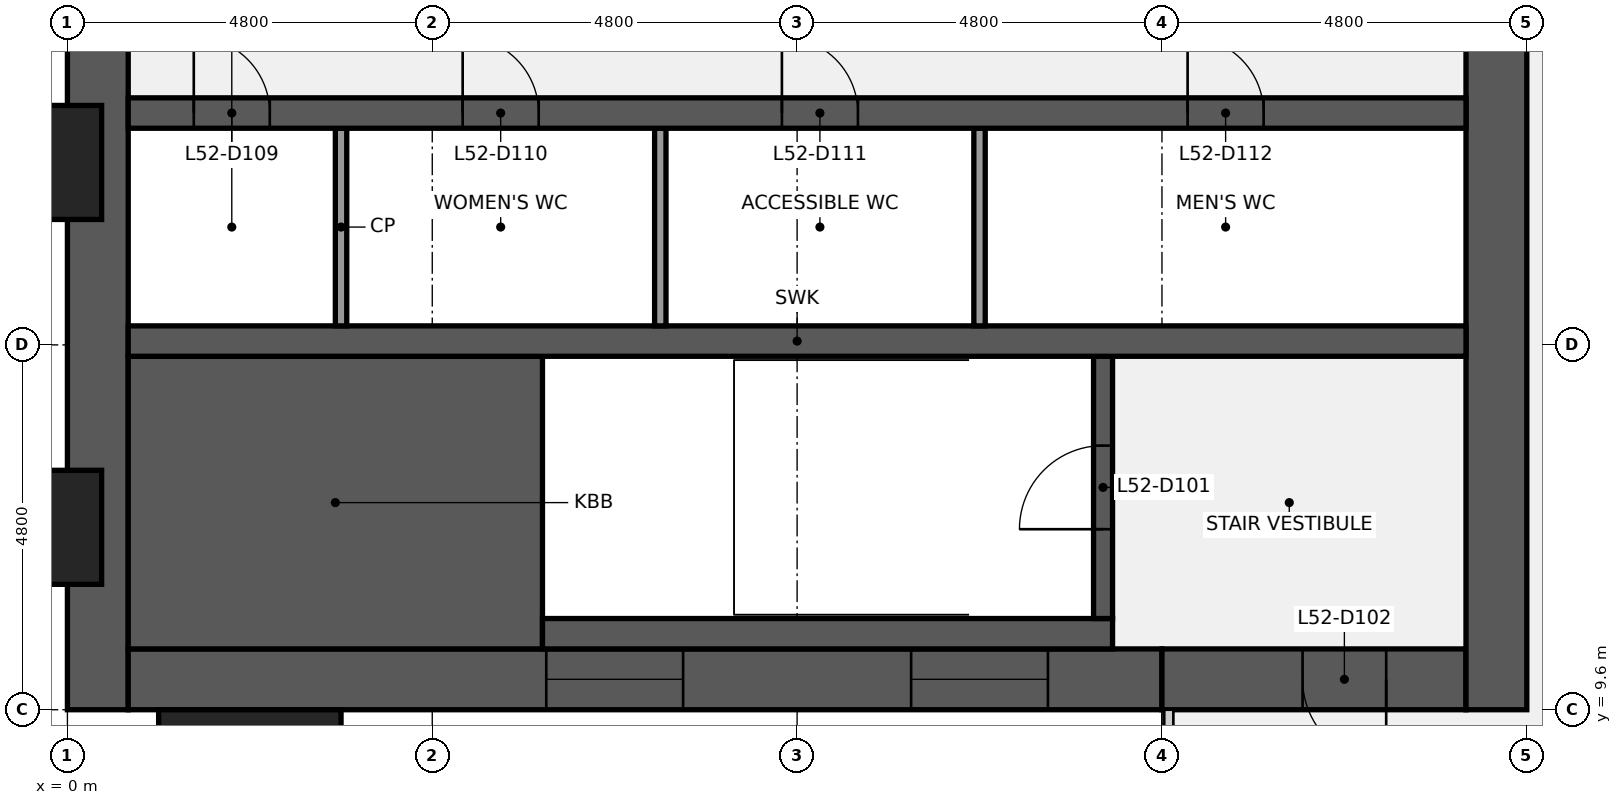
"""IFC4 building model, lengths in metres.
Left out: names, types, materials, properties, quantities, classifications, styles, units other than length and angle.
Written with IfcOpenShell. Run it as: python <this file> out.ifc"""

import sys

from ifc_helpers import new_model, si_unit, direction, frame, frame_2d, origin, origin_2d, place, context, subcontext, project, spatial, rectangle, extrude, element, fill, save


model = new_model("IFC4")
c1 = context("Model", 3, precision=1e-05, world=origin(), true_north=direction((0.0, 1.0)))
c2 = subcontext(c1, "Body", "Model", "MODEL_VIEW")
j1 = project(units=[si_unit("LENGTHUNIT", "METRE"), si_unit("PLANEANGLEUNIT", "RADIAN")], contexts=[c1])
p1 = place(None, origin())
s1 = spatial("IfcSite", under=j1, at=p1, CompositionType="ELEMENT")
p2 = place(p1, origin())
s2 = spatial("IfcBuilding", under=s1, at=p2, CompositionType="ELEMENT")
p3 = place(p2, frame((0.0, 0.0, 237.2)))
s3 = spatial("IfcBuildingStorey", under=s2, at=p3, CompositionType="ELEMENT", Elevation=237.2)
p4 = place(p3, frame((0.4, 9.6, 0.0), z_axis=(0.0, 0.0, 1.0), x_axis=(0.0, 1.0, 0.0)))
e1 = element("IfcWall", 1, at=p4, inside=s3, PredefinedType="SHEAR", context=c2, shape_type="SweptSolid", body=[
    extrude(rectangle(XDim=28.8, YDim=0.8, at=frame_2d((14.4, 0.0))), origin(), (0.0, 0.0, 1.0), 3.84),
])
p5 = place(p4, frame((8.85, 0.0, 0.9)))
e2 = element("IfcOpeningElement", 2, at=p5, cuts=e1, PredefinedType="OPENING", context=c2, shape_type="SweptSolid", body=[
    extrude(rectangle(XDim=1.5, YDim=1.5, at=frame_2d((0.75, 0.75))), frame((0.0, 0.41, 0.0), z_axis=(0.0, -1.0, 0.0), x_axis=(1.0, 0.0, 0.0)), (0.0, 0.0, 1.0), 0.82),
])
p6 = place(p4, frame((18.45, 0.0, 0.9)))
e3 = element("IfcOpeningElement", 3, at=p6, cuts=e1, PredefinedType="OPENING", context=c2, shape_type="SweptSolid", body=[
    extrude(rectangle(XDim=1.5, YDim=1.5, at=frame_2d((0.75, 0.75))), frame((0.0, 0.41, 0.0), z_axis=(0.0, -1.0, 0.0), x_axis=(1.0, 0.0, 0.0)), (0.0, 0.0, 1.0), 0.82),
])
p7 = place(p3, frame((14.4, 10.0, 0.0), z_axis=(0.0, 0.0, 1.0), x_axis=(-1.0, 0.0, 0.0)))
e4 = element("IfcWall", 4, at=p7, inside=s3, PredefinedType="SHEAR", context=c2, shape_type="SweptSolid", body=[
    extrude(rectangle(XDim=13.6, YDim=0.8, at=frame_2d((6.8, 0.0))), origin(), (0.0, 0.0, 1.0), 3.84),
])
p8 = place(p7, frame((6.3, 0.0, 0.9)))
e5 = element("IfcOpeningElement", 5, at=p8, cuts=e4, PredefinedType="OPENING", context=c2, shape_type="SweptSolid", body=[
    extrude(rectangle(XDim=1.8, YDim=1.5, at=frame_2d((0.9, 0.75))), frame((0.0, 0.41, 0.0), z_axis=(0.0, -1.0, 0.0), x_axis=(1.0, 0.0, 0.0)), (0.0, 0.0, 1.0), 0.82),
])
p9 = place(p7, frame((1.5, 0.0, 0.9)))
e6 = element("IfcOpeningElement", 6, at=p9, cuts=e4, PredefinedType="OPENING", context=c2, shape_type="SweptSolid", body=[
    extrude(rectangle(XDim=1.8, YDim=1.5, at=frame_2d((0.9, 0.75))), frame((0.0, 0.41, 0.0), z_axis=(0.0, -1.0, 0.0), x_axis=(1.0, 0.0, 0.0)), (0.0, 0.0, 1.0), 0.82),
])
p10 = place(p3, frame((18.4, 10.0, 0.0), z_axis=(0.0, 0.0, 1.0), x_axis=(-1.0, 0.0, 0.0)))
e7 = element("IfcWall", 7, at=p10, inside=s3, PredefinedType="SHEAR", context=c2, shape_type="SweptSolid", body=[
    extrude(rectangle(XDim=4.0, YDim=0.8, at=frame_2d((2.0, 0.0))), origin(), (0.0, 0.0, 1.0), 3.84),
])
p11 = place(p10, frame((1.05, 0.0, 0.0)))
e8 = element("IfcOpeningElement", 8, at=p11, cuts=e7, PredefinedType="OPENING", context=c2, shape_type="SweptSolid", body=[
    extrude(rectangle(XDim=1.1, YDim=2.1, at=frame_2d((0.55, 1.05))), frame((0.0, 0.41, 0.0), z_axis=(0.0, -1.0, 0.0), x_axis=(1.0, 0.0, 0.0)), (0.0, 0.0, 1.0), 0.82),
])
p12 = place(p3, frame((18.8, 38.4, 0.0), z_axis=(0.0, 0.0, 1.0), x_axis=(0.0, -1.0, 0.0)))
e9 = element("IfcWall", 9, at=p12, inside=s3, PredefinedType="SHEAR", context=c2, shape_type="SweptSolid", body=[
    extrude(rectangle(XDim=28.8, YDim=0.8, at=frame_2d((14.4, 0.0))), origin(), (0.0, 0.0, 1.0), 3.84),
])
p13 = place(p12, frame((18.3, 0.0, 0.0)))
e10 = element("IfcOpeningElement", 10, at=p13, cuts=e9, PredefinedType="OPENING", context=c2, shape_type="SweptSolid", body=[
    extrude(rectangle(XDim=1.8, YDim=2.1, at=frame_2d((0.9, 1.05))), frame((0.0, 0.41, 0.0), z_axis=(0.0, -1.0, 0.0), x_axis=(1.0, 0.0, 0.0)), (0.0, 0.0, 1.0), 0.82),
])
p14 = place(p12, frame((8.7, 0.0, 0.0)))
e11 = element("IfcOpeningElement", 11, at=p14, cuts=e9, PredefinedType="OPENING", context=c2, shape_type="SweptSolid", body=[
    extrude(rectangle(XDim=1.8, YDim=2.1, at=frame_2d((0.9, 1.05))), frame((0.0, 0.41, 0.0), z_axis=(0.0, -1.0, 0.0), x_axis=(1.0, 0.0, 0.0)), (0.0, 0.0, 1.0), 0.82),
])
p15 = place(p3, frame((0.8, 12.325, 0.0), z_axis=(0.0, 0.0, 1.0), x_axis=(1.0, 0.0, 0.0)))
e12 = element("IfcWall", 12, at=p15, inside=s3, PredefinedType="SHEAR", context=c2, shape_type="SweptSolid", body=[
    extrude(rectangle(XDim=5.45, YDim=3.85, at=frame_2d((2.725, 0.0))), origin(), (0.0, 0.0, 1.0), 3.84),
])
p16 = place(p3, frame((6.25, 10.6, 0.0), z_axis=(0.0, 0.0, 1.0), x_axis=(1.0, 0.0, 0.0)))
e13 = element("IfcWall", 13, at=p16, inside=s3, PredefinedType="SHEAR", context=c2, shape_type="SweptSolid", body=[
    extrude(rectangle(XDim=7.5, YDim=0.4, at=frame_2d((3.75, 0.0))), origin(), (0.0, 0.0, 1.0), 3.84),
])
p17 = place(p3, frame((13.625, 10.8, 0.0), z_axis=(0.0, 0.0, 1.0), x_axis=(0.0, 1.0, 0.0)))
e14 = element("IfcWall", 14, at=p17, inside=s3, PredefinedType="SHEAR", context=c2, shape_type="SweptSolid", body=[
    extrude(rectangle(XDim=3.45, YDim=0.25, at=frame_2d((1.725, 0.0))), origin(), (0.0, 0.0, 1.0), 3.84),
])
p18 = place(p17, frame((1.175, 0.0, 0.0)))
e15 = element("IfcOpeningElement", 15, at=p18, cuts=e14, PredefinedType="OPENING", context=c2, shape_type="SweptSolid", body=[
    extrude(rectangle(XDim=1.1, YDim=2.1, at=frame_2d((0.55, 1.05))), frame((0.0, 0.135, 0.0), z_axis=(0.0, -1.0, 0.0), x_axis=(1.0, 0.0, 0.0)), (0.0, 0.0, 1.0), 0.27),
])
p19 = place(p3, frame((0.8, 14.45, 0.0), z_axis=(0.0, 0.0, 1.0), x_axis=(1.0, 0.0, 0.0)))
e16 = element("IfcWall", 16, at=p19, inside=s3, PredefinedType="SHEAR", context=c2, shape_type="SweptSolid", body=[
    extrude(rectangle(XDim=17.6, YDim=0.4, at=frame_2d((8.8, 0.0))), origin(), (0.0, 0.0, 1.0), 3.84),
])
for number, where, z_axis, x_axis in (
    (17, (3.6, 14.65, 0.0), (0.0, 0.0, 1.0), (0.0, 1.0, 0.0)),
    (18, (7.8, 14.65, 0.0), (0.0, 0.0, 1.0), (0.0, 1.0, 0.0)),
    (19, (12.0, 14.65, 0.0), (0.0, 0.0, 1.0), (0.0, 1.0, 0.0)),
):
    element("IfcWall", number, at=place(p3, frame(where, z_axis=z_axis, x_axis=x_axis)), inside=s3, PredefinedType="PARTITIONING", context=c2, shape_type="SweptSolid", body=[
        extrude(rectangle(XDim=2.6, YDim=0.15, at=frame_2d((1.3, 0.0))), origin(), (0.0, 0.0, 1.0), 3.84),
    ])
p20 = place(p3, frame((0.8, 17.45, 0.0), z_axis=(0.0, 0.0, 1.0), x_axis=(1.0, 0.0, 0.0)))
e20 = element("IfcWall", 20, at=p20, inside=s3, PredefinedType="SHEAR", context=c2, shape_type="SweptSolid", body=[
    extrude(rectangle(XDim=17.6, YDim=0.4, at=frame_2d((8.8, 0.0))), origin(), (0.0, 0.0, 1.0), 3.84),
])
p21 = place(p20, frame((0.863, 0.0, 0.0)))
e21 = element("IfcOpeningElement", 21, at=p21, cuts=e20, PredefinedType="OPENING", context=c2, shape_type="SweptSolid", body=[
    extrude(rectangle(XDim=1.0, YDim=2.1, at=frame_2d((0.5, 1.05))), frame((0.0, 0.21, 0.0), z_axis=(0.0, -1.0, 0.0), x_axis=(1.0, 0.0, 0.0)), (0.0, 0.0, 1.0), 0.42),
])
p22 = place(p20, frame((4.4, 0.0, 0.0)))
e22 = element("IfcOpeningElement", 22, at=p22, cuts=e20, PredefinedType="OPENING", context=c2, shape_type="SweptSolid", body=[
    extrude(rectangle(XDim=1.0, YDim=2.1, at=frame_2d((0.5, 1.05))), frame((0.0, 0.21, 0.0), z_axis=(0.0, -1.0, 0.0), x_axis=(1.0, 0.0, 0.0)), (0.0, 0.0, 1.0), 0.42),
])
p23 = place(p20, frame((8.6, 0.0, 0.0)))
e23 = element("IfcOpeningElement", 23, at=p23, cuts=e20, PredefinedType="OPENING", context=c2, shape_type="SweptSolid", body=[
    extrude(rectangle(XDim=1.0, YDim=2.1, at=frame_2d((0.5, 1.05))), frame((0.0, 0.21, 0.0), z_axis=(0.0, -1.0, 0.0), x_axis=(1.0, 0.0, 0.0)), (0.0, 0.0, 1.0), 0.42),
])
p24 = place(p20, frame((13.938, 0.0, 0.0)))
e24 = element("IfcOpeningElement", 24, at=p24, cuts=e20, PredefinedType="OPENING", context=c2, shape_type="SweptSolid", body=[
    extrude(rectangle(XDim=1.0, YDim=2.1, at=frame_2d((0.5, 1.05))), frame((0.0, 0.21, 0.0), z_axis=(0.0, -1.0, 0.0), x_axis=(1.0, 0.0, 0.0)), (0.0, 0.0, 1.0), 0.42),
])
for number, where, z_axis, x_axis in (
    (25, (-0.75, 12.0, 0.0), (0.0, 0.0, 1.0), (0.0, 1.0, 0.0)),
    (26, (-0.75, 16.8, 0.0), (0.0, 0.0, 1.0), (0.0, 1.0, 0.0)),
    (27, (2.4, 8.85, 0.0), (0.0, 0.0, 1.0), (1.0, 0.0, 0.0)),
):
    element("IfcColumn", number, at=place(p3, frame(where, z_axis=z_axis, x_axis=x_axis)), inside=s3, PredefinedType="PILASTER", context=c2, shape_type="SweptSolid", body=[
        extrude(rectangle(XDim=2.4, YDim=1.5, at=origin_2d()), origin(), (0.0, 0.0, 1.0), 4.0),
    ])
p25 = place(p18, origin())
e28 = element("IfcDoor", 28, at=p25, inside=s3, OperationType="SINGLE_SWING_LEFT", PredefinedType="DOOR", context=c2, shape_type="SweptSolid", body=[
    extrude(rectangle(XDim=1.1, YDim=2.1, at=frame_2d((0.55, 1.05))), frame((0.0, 0.025, 0.0), z_axis=(0.0, -1.0, 0.0), x_axis=(1.0, 0.0, 0.0)), (0.0, 0.0, 1.0), 0.05),
])
fill(e15, e28)
p26 = place(p11, origin())
e29 = element("IfcDoor", 29, at=p26, inside=s3, OperationType="SINGLE_SWING_LEFT", PredefinedType="DOOR", context=c2, shape_type="SweptSolid", body=[
    extrude(rectangle(XDim=1.1, YDim=2.1, at=frame_2d((0.55, 1.05))), frame((0.0, 0.025, 0.0), z_axis=(0.0, -1.0, 0.0), x_axis=(1.0, 0.0, 0.0)), (0.0, 0.0, 1.0), 0.05),
])
fill(e8, e29)
p27 = place(p21, origin())
e30 = element("IfcDoor", 30, at=p27, inside=s3, OperationType="SINGLE_SWING_LEFT", PredefinedType="DOOR", context=c2, shape_type="SweptSolid", body=[
    extrude(rectangle(XDim=1.0, YDim=2.1, at=frame_2d((0.5, 1.05))), frame((0.0, 0.025, 0.0), z_axis=(0.0, -1.0, 0.0), x_axis=(1.0, 0.0, 0.0)), (0.0, 0.0, 1.0), 0.05),
])
fill(e21, e30)
p28 = place(p22, origin())
e31 = element("IfcDoor", 31, at=p28, inside=s3, OperationType="SINGLE_SWING_LEFT", PredefinedType="DOOR", context=c2, shape_type="SweptSolid", body=[
    extrude(rectangle(XDim=1.0, YDim=2.1, at=frame_2d((0.5, 1.05))), frame((0.0, 0.025, 0.0), z_axis=(0.0, -1.0, 0.0), x_axis=(1.0, 0.0, 0.0)), (0.0, 0.0, 1.0), 0.05),
])
fill(e22, e31)
p29 = place(p23, origin())
e32 = element("IfcDoor", 32, at=p29, inside=s3, OperationType="SINGLE_SWING_LEFT", PredefinedType="DOOR", context=c2, shape_type="SweptSolid", body=[
    extrude(rectangle(XDim=1.0, YDim=2.1, at=frame_2d((0.5, 1.05))), frame((0.0, 0.025, 0.0), z_axis=(0.0, -1.0, 0.0), x_axis=(1.0, 0.0, 0.0)), (0.0, 0.0, 1.0), 0.05),
])
fill(e23, e32)
p30 = place(p24, origin())
e33 = element("IfcDoor", 33, at=p30, inside=s3, OperationType="SINGLE_SWING_LEFT", PredefinedType="DOOR", context=c2, shape_type="SweptSolid", body=[
    extrude(rectangle(XDim=1.0, YDim=2.1, at=frame_2d((0.5, 1.05))), frame((0.0, 0.025, 0.0), z_axis=(0.0, -1.0, 0.0), x_axis=(1.0, 0.0, 0.0)), (0.0, 0.0, 1.0), 0.05),
])
fill(e24, e33)
p31 = place(p8, origin())
e34 = element("IfcWindow", 34, at=p31, inside=s3, PartitioningType="SINGLE_PANEL", PredefinedType="WINDOW", context=c2, shape_type="SweptSolid", body=[
    extrude(rectangle(XDim=1.8, YDim=1.5, at=frame_2d((0.9, 0.75))), frame((0.0, 0.03, 0.0), z_axis=(0.0, -1.0, 0.0), x_axis=(1.0, 0.0, 0.0)), (0.0, 0.0, 1.0), 0.06),
])
fill(e5, e34)
p32 = place(p9, origin())
e35 = element("IfcWindow", 35, at=p32, inside=s3, PartitioningType="SINGLE_PANEL", PredefinedType="WINDOW", context=c2, shape_type="SweptSolid", body=[
    extrude(rectangle(XDim=1.8, YDim=1.5, at=frame_2d((0.9, 0.75))), frame((0.0, 0.03, 0.0), z_axis=(0.0, -1.0, 0.0), x_axis=(1.0, 0.0, 0.0)), (0.0, 0.0, 1.0), 0.06),
])
fill(e6, e35)
save(model, sys.argv[1])
